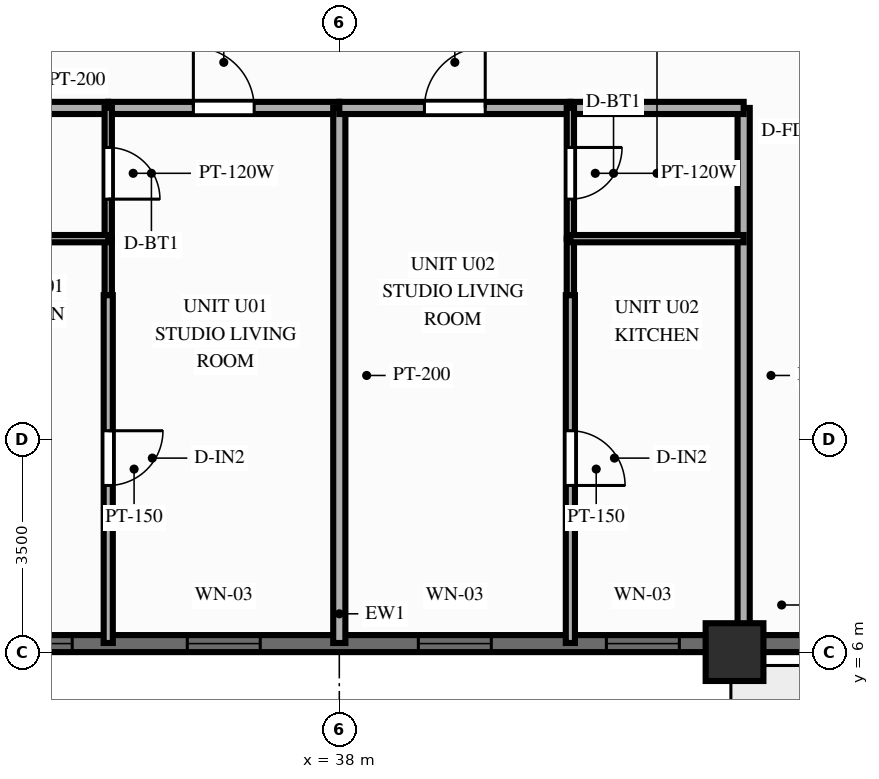
"""IFC4 building model, lengths in metres.
Left out: names, types, materials, properties, quantities, classifications, styles, units other than length and angle.
Written with IfcOpenShell. Run it as: python <this file> out.ifc"""

import sys

from ifc_helpers import new_model, si_unit, direction, frame, frame_2d, origin, origin_2d, place, context, subcontext, project, spatial, rectangle, extrude, source, transform, mapped, element, fill, save


model = new_model("IFC4")
c1 = context("Model", 3, precision=1e-05, world=origin(), true_north=direction((0.0, 1.0)))
c2 = subcontext(c1, "Body", "Model", "MODEL_VIEW")
j1 = project(units=[si_unit("LENGTHUNIT", "METRE"), si_unit("PLANEANGLEUNIT", "RADIAN")], contexts=[c1])
p1 = place(None, origin())
s1 = spatial("IfcSite", under=j1, at=p1, CompositionType="ELEMENT")
p2 = place(p1, origin())
s2 = spatial("IfcBuilding", under=s1, at=p2, CompositionType="ELEMENT")
p3 = place(p2, frame((0.0, 0.0, 152.2)))
s3 = spatial("IfcBuildingStorey", under=s2, at=p3, CompositionType="ELEMENT", Elevation=152.2)
m1 = source(origin(), c2, "Body", "SweptSolid", [
    extrude(rectangle(XDim=0.95, YDim=0.95, at=origin_2d()), origin(), (0.0, 0.0, 1.0), 3.9),
])
p4 = place(p3, frame((44.5, 6.0, 0.0), z_axis=(0.0, 0.0, 1.0), x_axis=(1.0, 0.0, 0.0)))
e1 = element("IfcColumn", 1, at=p4, inside=s3, PredefinedType="COLUMN", context=c2, shape_type="MappedRepresentation", body=[
    mapped(m1, transform((0.0, 0.0, 0.0), scale=1.0)),
])
p5 = place(p3, frame((21.0, 6.14, 0.0), z_axis=(0.0, 0.0, 1.0), x_axis=(1.0, 0.0, 0.0)))
e2 = element("IfcWall", 2, at=p5, inside=s3, PredefinedType="SOLIDWALL", context=c2, shape_type="SweptSolid", body=[
    extrude(rectangle(XDim=34.0, YDim=0.28, at=frame_2d((17.0, 0.0))), origin(), (0.0, 0.0, 1.0), 2.44),
])
p6 = place(p5, frame((4.65, 0.0, 0.25)))
e3 = element("IfcOpeningElement", 3, at=p6, cuts=e2, PredefinedType="OPENING", context=c2, shape_type="SweptSolid", body=[
    extrude(rectangle(XDim=1.2, YDim=1.5, at=frame_2d((0.6, 0.75))), frame((0.0, 0.152, 0.0), z_axis=(0.0, -1.0, 0.0), x_axis=(1.0, 0.0, 0.0)), (0.0, 0.0, 1.0), 0.304),
])
p7 = place(p5, frame((11.407, 0.0, 0.25)))
e4 = element("IfcOpeningElement", 4, at=p7, cuts=e2, PredefinedType="OPENING", context=c2, shape_type="SweptSolid", body=[
    extrude(rectangle(XDim=1.2, YDim=1.5, at=frame_2d((0.6, 0.75))), frame((0.0, 0.152, 0.0), z_axis=(0.0, -1.0, 0.0), x_axis=(1.0, 0.0, 0.0)), (0.0, 0.0, 1.0), 0.304),
])
p8 = place(p5, frame((14.5, 0.0, 0.25)))
e5 = element("IfcOpeningElement", 5, at=p8, cuts=e2, PredefinedType="OPENING", context=c2, shape_type="SweptSolid", body=[
    extrude(rectangle(XDim=1.2, YDim=1.5, at=frame_2d((0.6, 0.75))), frame((0.0, 0.152, 0.0), z_axis=(0.0, -1.0, 0.0), x_axis=(1.0, 0.0, 0.0)), (0.0, 0.0, 1.0), 0.304),
])
p9 = place(p5, frame((18.3, 0.0, 0.25)))
e6 = element("IfcOpeningElement", 6, at=p9, cuts=e2, PredefinedType="OPENING", context=c2, shape_type="SweptSolid", body=[
    extrude(rectangle(XDim=1.2, YDim=1.5, at=frame_2d((0.6, 0.75))), frame((0.0, 0.152, 0.0), z_axis=(0.0, -1.0, 0.0), x_axis=(1.0, 0.0, 0.0)), (0.0, 0.0, 1.0), 0.304),
])
p10 = place(p5, frame((21.393, 0.0, 0.25)))
e7 = element("IfcOpeningElement", 7, at=p10, cuts=e2, PredefinedType="OPENING", context=c2, shape_type="SweptSolid", body=[
    extrude(rectangle(XDim=1.2, YDim=1.5, at=frame_2d((0.6, 0.75))), frame((0.0, 0.152, 0.0), z_axis=(0.0, -1.0, 0.0), x_axis=(1.0, 0.0, 0.0)), (0.0, 0.0, 1.0), 0.304),
])
p11 = place(p5, frame((28.15, 0.0, 0.25)))
e8 = element("IfcOpeningElement", 8, at=p11, cuts=e2, PredefinedType="OPENING", context=c2, shape_type="SweptSolid", body=[
    extrude(rectangle(XDim=1.2, YDim=1.5, at=frame_2d((0.6, 0.75))), frame((0.0, 0.152, 0.0), z_axis=(0.0, -1.0, 0.0), x_axis=(1.0, 0.0, 0.0)), (0.0, 0.0, 1.0), 0.304),
])
p12 = place(p3, frame((44.65, 14.95, 0.0), z_axis=(0.0, 0.0, 1.0), x_axis=(0.0, -1.0, 0.0)))
e9 = element("IfcWall", 9, at=p12, inside=s3, PredefinedType="PARTITIONING", context=c2, shape_type="SweptSolid", body=[
    extrude(rectangle(XDim=8.8, YDim=0.2, at=frame_2d((4.4, 0.0))), origin(), (0.0, 0.0, 1.0), 2.44),
])
p13 = place(p3, frame((31.35, 14.95, 0.0), z_axis=(0.0, 0.0, 1.0), x_axis=(1.0, 0.0, 0.0)))
e10 = element("IfcWall", 10, at=p13, inside=s3, PredefinedType="PARTITIONING", context=c2, shape_type="SweptSolid", body=[
    extrude(rectangle(XDim=2.85, YDim=0.2, at=frame_2d((1.425, 0.0))), origin(), (0.0, 0.0, 1.0), 3.56),
])
p14 = place(p3, frame((34.2, 14.95, 0.0), z_axis=(0.0, 0.0, 1.0), x_axis=(1.0, 0.0, 0.0)))
e11 = element("IfcWall", 11, at=p14, inside=s3, PredefinedType="PARTITIONING", context=c2, shape_type="SweptSolid", body=[
    extrude(rectangle(XDim=3.8, YDim=0.2, at=frame_2d((1.9, 0.0))), origin(), (0.0, 0.0, 1.0), 3.56),
])
p15 = place(p14, frame((1.4, 0.0, 0.0)))
e12 = element("IfcOpeningElement", 12, at=p15, cuts=e11, PredefinedType="OPENING", context=c2, shape_type="SweptSolid", body=[
    extrude(rectangle(XDim=1.0, YDim=2.15, at=frame_2d((0.5, 1.075))), frame((0.0, 0.112, 0.0), z_axis=(0.0, -1.0, 0.0), x_axis=(1.0, 0.0, 0.0)), (0.0, 0.0, 1.0), 0.224),
])
p16 = place(p3, frame((34.2, 14.95, 0.0), z_axis=(0.0, 0.0, 1.0), x_axis=(0.0, -1.0, 0.0)))
e13 = element("IfcWall", 13, at=p16, inside=s3, PredefinedType="PARTITIONING", context=c2, shape_type="SweptSolid", body=[
    extrude(rectangle(XDim=2.15, YDim=0.12, at=frame_2d((1.075, 0.0))), origin(), (0.0, 0.0, 1.0), 3.56),
])
p17 = place(p16, frame((0.65, 0.0, 0.0)))
e14 = element("IfcOpeningElement", 14, at=p17, cuts=e13, PredefinedType="OPENING", context=c2, shape_type="SweptSolid", body=[
    extrude(rectangle(XDim=0.85, YDim=2.05, at=frame_2d((0.425, 1.025))), frame((0.0, 0.072, 0.0), z_axis=(0.0, -1.0, 0.0), x_axis=(1.0, 0.0, 0.0)), (0.0, 0.0, 1.0), 0.144),
])
p18 = place(p3, frame((34.2, 12.8, 0.0), z_axis=(0.0, 0.0, 1.0), x_axis=(0.0, -1.0, 0.0)))
e15 = element("IfcWall", 15, at=p18, inside=s3, PredefinedType="PARTITIONING", context=c2, shape_type="SweptSolid", body=[
    extrude(rectangle(XDim=0.93, YDim=0.12, at=frame_2d((0.465, 0.0))), origin(), (0.0, 0.0, 1.0), 3.56),
])
p19 = place(p3, frame((31.35, 12.8, 0.0), z_axis=(0.0, 0.0, 1.0), x_axis=(1.0, 0.0, 0.0)))
e16 = element("IfcWall", 16, at=p19, inside=s3, PredefinedType="PARTITIONING", context=c2, shape_type="SweptSolid", body=[
    extrude(rectangle(XDim=2.85, YDim=0.12, at=frame_2d((1.425, 0.0))), origin(), (0.0, 0.0, 1.0), 3.56),
])
p20 = place(p3, frame((34.2, 11.87, 0.0), z_axis=(0.0, 0.0, 1.0), x_axis=(0.0, -1.0, 0.0)))
e17 = element("IfcWall", 17, at=p20, inside=s3, PredefinedType="PARTITIONING", context=c2, shape_type="SweptSolid", body=[
    extrude(rectangle(XDim=5.72, YDim=0.15, at=frame_2d((2.86, 0.0))), origin(), (0.0, 0.0, 1.0), 3.56),
])
p21 = place(p20, frame((2.229, 0.0, 0.0)))
e18 = element("IfcOpeningElement", 18, at=p21, cuts=e17, PredefinedType="OPENING", context=c2, shape_type="SweptSolid", body=[
    extrude(rectangle(XDim=0.9, YDim=2.1, at=frame_2d((0.45, 1.05))), frame((0.0, 0.087, 0.0), z_axis=(0.0, -1.0, 0.0), x_axis=(1.0, 0.0, 0.0)), (0.0, 0.0, 1.0), 0.174),
])
p22 = place(p3, frame((38.0, 14.95, 0.0), z_axis=(0.0, 0.0, 1.0), x_axis=(0.0, -1.0, 0.0)))
e19 = element("IfcWall", 19, at=p22, inside=s3, PredefinedType="PARTITIONING", context=c2, shape_type="SweptSolid", body=[
    extrude(rectangle(XDim=8.8, YDim=0.2, at=frame_2d((4.4, 0.0))), origin(), (0.0, 0.0, 1.0), 3.56),
])
p23 = place(p3, frame((38.0, 14.95, 0.0), z_axis=(0.0, 0.0, 1.0), x_axis=(1.0, 0.0, 0.0)))
e20 = element("IfcWall", 20, at=p23, inside=s3, PredefinedType="PARTITIONING", context=c2, shape_type="SweptSolid", body=[
    extrude(rectangle(XDim=3.8, YDim=0.2, at=frame_2d((1.9, 0.0))), origin(), (0.0, 0.0, 1.0), 3.56),
])
p24 = place(p23, frame((1.4, 0.0, 0.0)))
e21 = element("IfcOpeningElement", 21, at=p24, cuts=e20, PredefinedType="OPENING", context=c2, shape_type="SweptSolid", body=[
    extrude(rectangle(XDim=1.0, YDim=2.15, at=frame_2d((0.5, 1.075))), frame((0.0, 0.112, 0.0), z_axis=(0.0, -1.0, 0.0), x_axis=(1.0, 0.0, 0.0)), (0.0, 0.0, 1.0), 0.224),
])
p25 = place(p3, frame((41.8, 14.95, 0.0), z_axis=(0.0, 0.0, 1.0), x_axis=(1.0, 0.0, 0.0)))
e22 = element("IfcWall", 22, at=p25, inside=s3, PredefinedType="PARTITIONING", context=c2, shape_type="SweptSolid", body=[
    extrude(rectangle(XDim=2.85, YDim=0.2, at=frame_2d((1.425, 0.0))), origin(), (0.0, 0.0, 1.0), 3.56),
])
p26 = place(p3, frame((41.8, 14.95, 0.0), z_axis=(0.0, 0.0, 1.0), x_axis=(0.0, -1.0, 0.0)))
e23 = element("IfcWall", 23, at=p26, inside=s3, PredefinedType="PARTITIONING", context=c2, shape_type="SweptSolid", body=[
    extrude(rectangle(XDim=2.15, YDim=0.12, at=frame_2d((1.075, 0.0))), origin(), (0.0, 0.0, 1.0), 3.56),
])
p27 = place(p26, frame((0.65, 0.0, 0.0)))
e24 = element("IfcOpeningElement", 24, at=p27, cuts=e23, PredefinedType="OPENING", context=c2, shape_type="SweptSolid", body=[
    extrude(rectangle(XDim=0.85, YDim=2.05, at=frame_2d((0.425, 1.025))), frame((0.0, 0.072, 0.0), z_axis=(0.0, -1.0, 0.0), x_axis=(1.0, 0.0, 0.0)), (0.0, 0.0, 1.0), 0.144),
])
p28 = place(p3, frame((41.8, 12.8, 0.0), z_axis=(0.0, 0.0, 1.0), x_axis=(0.0, -1.0, 0.0)))
e25 = element("IfcWall", 25, at=p28, inside=s3, PredefinedType="PARTITIONING", context=c2, shape_type="SweptSolid", body=[
    extrude(rectangle(XDim=0.93, YDim=0.12, at=frame_2d((0.465, 0.0))), origin(), (0.0, 0.0, 1.0), 3.56),
])
p29 = place(p3, frame((41.8, 12.8, 0.0), z_axis=(0.0, 0.0, 1.0), x_axis=(1.0, 0.0, 0.0)))
e26 = element("IfcWall", 26, at=p29, inside=s3, PredefinedType="PARTITIONING", context=c2, shape_type="SweptSolid", body=[
    extrude(rectangle(XDim=2.85, YDim=0.12, at=frame_2d((1.425, 0.0))), origin(), (0.0, 0.0, 1.0), 3.56),
])
p30 = place(p3, frame((41.8, 11.87, 0.0), z_axis=(0.0, 0.0, 1.0), x_axis=(0.0, -1.0, 0.0)))
e27 = element("IfcWall", 27, at=p30, inside=s3, PredefinedType="PARTITIONING", context=c2, shape_type="SweptSolid", body=[
    extrude(rectangle(XDim=5.72, YDim=0.15, at=frame_2d((2.86, 0.0))), origin(), (0.0, 0.0, 1.0), 3.56),
])
p31 = place(p30, frame((2.229, 0.0, 0.0)))
e28 = element("IfcOpeningElement", 28, at=p31, cuts=e27, PredefinedType="OPENING", context=c2, shape_type="SweptSolid", body=[
    extrude(rectangle(XDim=0.9, YDim=2.1, at=frame_2d((0.45, 1.05))), frame((0.0, 0.087, 0.0), z_axis=(0.0, -1.0, 0.0), x_axis=(1.0, 0.0, 0.0)), (0.0, 0.0, 1.0), 0.174),
])
m2 = source(origin(), c2, "Body", "SweptSolid", [
    extrude(rectangle(XDim=1.2, YDim=1.5, at=frame_2d((0.6, 0.75))), frame((0.0, 0.03, 0.0), z_axis=(0.0, -1.0, 0.0), x_axis=(1.0, 0.0, 0.0)), (0.0, 0.0, 1.0), 0.06),
])
p32 = place(p7, origin())
e29 = element("IfcWindow", 29, at=p32, inside=s3, PartitioningType="SINGLE_PANEL", PredefinedType="WINDOW", context=c2, shape_type="MappedRepresentation", body=[
    mapped(m2, transform((0.0, 0.0, 0.0), scale=1.0)),
])
fill(e4, e29)
p33 = place(p8, origin())
e30 = element("IfcWindow", 30, at=p33, inside=s3, PartitioningType="SINGLE_PANEL", PredefinedType="WINDOW", context=c2, shape_type="MappedRepresentation", body=[
    mapped(m2, transform((0.0, 0.0, 0.0), scale=1.0)),
])
fill(e5, e30)
p34 = place(p9, origin())
e31 = element("IfcWindow", 31, at=p34, inside=s3, PartitioningType="SINGLE_PANEL", PredefinedType="WINDOW", context=c2, shape_type="MappedRepresentation", body=[
    mapped(m2, transform((0.0, 0.0, 0.0), scale=1.0)),
])
fill(e6, e31)
p35 = place(p10, origin())
e32 = element("IfcWindow", 32, at=p35, inside=s3, PartitioningType="SINGLE_PANEL", PredefinedType="WINDOW", context=c2, shape_type="MappedRepresentation", body=[
    mapped(m2, transform((0.0, 0.0, 0.0), scale=1.0)),
])
fill(e7, e32)
m3 = source(origin(), c2, "Body", "SweptSolid", [
    extrude(rectangle(XDim=1.0, YDim=2.15, at=frame_2d((0.5, 1.075))), frame((0.0, 0.025, 0.0), z_axis=(0.0, -1.0, 0.0), x_axis=(1.0, 0.0, 0.0)), (0.0, 0.0, 1.0), 0.05),
])
p36 = place(p15, origin())
e33 = element("IfcDoor", 33, at=p36, inside=s3, OperationType="SINGLE_SWING_LEFT", PredefinedType="DOOR", context=c2, shape_type="MappedRepresentation", body=[
    mapped(m3, transform((0.0, 0.0, 0.0), scale=1.0)),
])
fill(e12, e33)
m4 = source(origin(), c2, "Body", "SweptSolid", [
    extrude(rectangle(XDim=0.85, YDim=2.05, at=frame_2d((0.425, 1.025))), frame((0.0, 0.025, 0.0), z_axis=(0.0, -1.0, 0.0), x_axis=(1.0, 0.0, 0.0)), (0.0, 0.0, 1.0), 0.05),
])
p37 = place(p17, origin())
e34 = element("IfcDoor", 34, at=p37, inside=s3, OperationType="SINGLE_SWING_RIGHT", PredefinedType="DOOR", context=c2, shape_type="MappedRepresentation", body=[
    mapped(m4, transform((0.0, 0.0, 0.0), scale=1.0)),
])
fill(e14, e34)
m5 = source(origin(), c2, "Body", "SweptSolid", [
    extrude(rectangle(XDim=0.9, YDim=2.1, at=frame_2d((0.45, 1.05))), frame((0.0, 0.025, 0.0), z_axis=(0.0, -1.0, 0.0), x_axis=(1.0, 0.0, 0.0)), (0.0, 0.0, 1.0), 0.05),
])
p38 = place(p21, origin())
e35 = element("IfcDoor", 35, at=p38, inside=s3, OperationType="SINGLE_SWING_LEFT", PredefinedType="DOOR", context=c2, shape_type="MappedRepresentation", body=[
    mapped(m5, transform((0.0, 0.0, 0.0), scale=1.0)),
])
fill(e18, e35)
p39 = place(p24, origin())
e36 = element("IfcDoor", 36, at=p39, inside=s3, OperationType="SINGLE_SWING_RIGHT", PredefinedType="DOOR", context=c2, shape_type="MappedRepresentation", body=[
    mapped(m3, transform((0.0, 0.0, 0.0), scale=1.0)),
])
fill(e21, e36)
p40 = place(p27, origin())
e37 = element("IfcDoor", 37, at=p40, inside=s3, OperationType="SINGLE_SWING_LEFT", PredefinedType="DOOR", context=c2, shape_type="MappedRepresentation", body=[
    mapped(m4, transform((0.0, 0.0, 0.0), scale=1.0)),
])
fill(e24, e37)
p41 = place(p31, origin())
e38 = element("IfcDoor", 38, at=p41, inside=s3, OperationType="SINGLE_SWING_RIGHT", PredefinedType="DOOR", context=c2, shape_type="MappedRepresentation", body=[
    mapped(m5, transform((0.0, 0.0, 0.0), scale=1.0)),
])
fill(e28, e38)
save(model, sys.argv[1])
